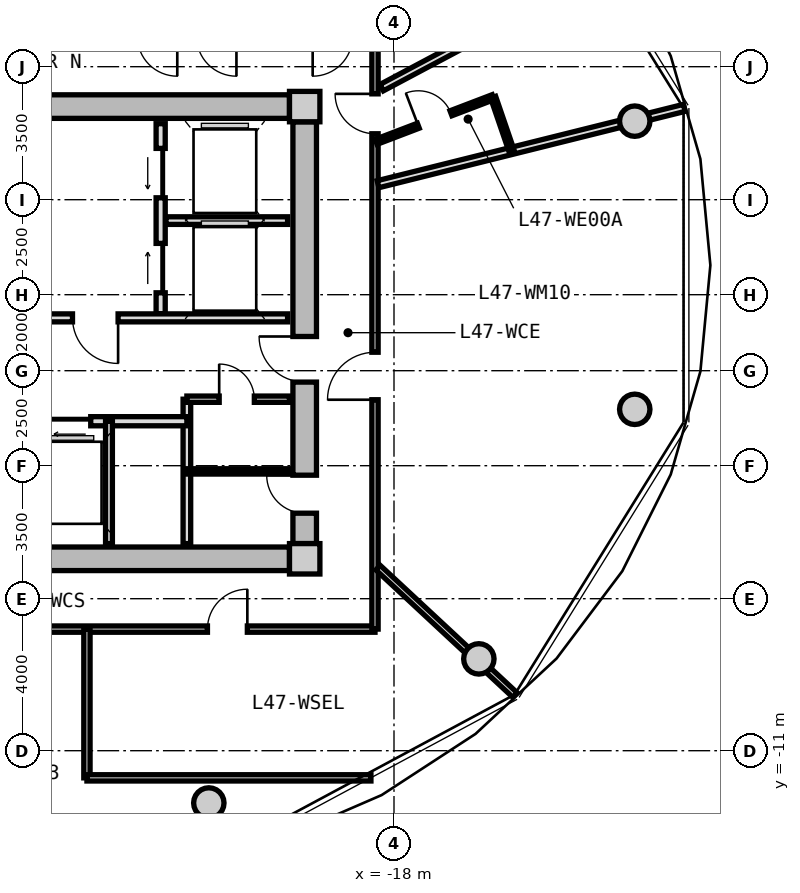
"""IFC4 building model, lengths in metres.
Left out: names, types, materials, properties, quantities, classifications, styles, units other than length and angle.
Written with IfcOpenShell. Run it as: python <this file> out.ifc"""

import sys

from ifc_helpers import new_model, si_unit, direction, frame, frame_2d, origin, origin_2d, place, context, subcontext, project, spatial, rectangle, circle, extrude, source, transform, mapped, element, fill, save


model = new_model("IFC4")
c1 = context("Model", 3, precision=1e-05, world=origin(), true_north=direction((0.0, 1.0)))
c2 = subcontext(c1, "Body", "Model", "MODEL_VIEW")
j1 = project(units=[si_unit("LENGTHUNIT", "METRE"), si_unit("PLANEANGLEUNIT", "RADIAN")], contexts=[c1])
p1 = place(None, origin())
s1 = spatial("IfcSite", under=j1, at=p1, CompositionType="ELEMENT")
p2 = place(p1, origin())
s2 = spatial("IfcBuilding", under=s1, at=p2, CompositionType="ELEMENT")
p3 = place(p2, frame((0.0, 0.0, 152.6)))
s3 = spatial("IfcBuildingStorey", under=s2, at=p3, CompositionType="ELEMENT", Elevation=152.6)
m1 = source(origin(), c2, "Body", "SweptSolid", [
    extrude(rectangle(XDim=0.8, YDim=0.8, at=origin_2d()), origin(), (0.0, 0.0, 1.0), 3.05),
])
for number, where, z_axis, x_axis in (
    (1, (-20.35, -5.95, 0.0), (0.0, 0.0, 1.0), (1.0, 0.0, 0.0)),
    (2, (-20.35, 5.95, 0.0), (0.0, 0.0, 1.0), (1.0, 0.0, 0.0)),
):
    element("IfcColumn", number, at=place(p3, frame(where, z_axis=z_axis, x_axis=x_axis)), inside=s3, PredefinedType="COLUMN", context=c2, shape_type="MappedRepresentation", body=[
        mapped(m1, transform((0.0, 0.0, 0.0), x_axis=(1.0, 0.0, 0.0), y_axis=(0.0, 1.0, 0.0), z_axis=(0.0, 0.0, 1.0), scale=1.0)),
    ])
m2 = source(origin(), c2, "Body", "SweptSolid", [
    extrude(rectangle(XDim=14.5, YDim=0.62, at=frame_2d((7.25, 0.0))), origin(), (0.0, 0.0, 1.0), 2.81),
])
for number, where, z_axis, x_axis in (
    (3, (-35.25, 5.95, 0.0), (0.0, 0.0, 1.0), (1.0, 0.0, 0.0)),
    (4, (-20.75, -5.95, 0.0), (0.0, 0.0, 1.0), (-1.0, 0.0, 0.0)),
):
    element("IfcWall", number, at=place(p3, frame(where, z_axis=z_axis, x_axis=x_axis)), inside=s3, PredefinedType="SHEAR", context=c2, shape_type="MappedRepresentation", body=[
        mapped(m2, transform((0.0, 0.0, 0.0), x_axis=(1.0, 0.0, 0.0), y_axis=(0.0, 1.0, 0.0), z_axis=(0.0, 0.0, 1.0), scale=1.0)),
    ])
m3 = source(origin(), c2, "Body", "SweptSolid", [
    extrude(rectangle(XDim=11.1, YDim=0.62, at=frame_2d((5.55, 0.0))), origin(), (0.0, 0.0, 1.0), 2.81),
])
p4 = place(p3, frame((-20.35, 5.55, 0.0), z_axis=(0.0, 0.0, 1.0), x_axis=(0.0, -1.0, 0.0)))
e5 = element("IfcWall", 5, at=p4, inside=s3, PredefinedType="SHEAR", context=c2, shape_type="MappedRepresentation", body=[
    mapped(m3, transform((0.0, 0.0, 0.0), x_axis=(1.0, 0.0, 0.0), y_axis=(0.0, 1.0, 0.0), z_axis=(0.0, 0.0, 1.0), scale=1.0)),
])
p5 = place(p4, frame((5.65, 0.0, 0.0)))
e6 = element("IfcOpeningElement", 6, at=p5, cuts=e5, PredefinedType="OPENING", context=c2, shape_type="SweptSolid", body=[
    extrude(rectangle(XDim=1.2, YDim=2.15, at=frame_2d((0.6, 1.075))), frame((0.0, 0.32, 0.0), z_axis=(0.0, -1.0, 0.0), x_axis=(1.0, 0.0, 0.0)), (0.0, 0.0, 1.0), 0.64),
])
p6 = place(p4, frame((9.3, 0.0, 0.0)))
e7 = element("IfcOpeningElement", 7, at=p6, cuts=e5, PredefinedType="OPENING", context=c2, shape_type="SweptSolid", body=[
    extrude(rectangle(XDim=1.0, YDim=2.1, at=frame_2d((0.5, 1.05))), frame((0.0, 0.32, 0.0), z_axis=(0.0, -1.0, 0.0), x_axis=(1.0, 0.0, 0.0)), (0.0, 0.0, 1.0), 0.64),
])
m4 = source(origin(), c2, "Body", "SweptSolid", [
    extrude(circle(Radius=0.4, at=origin_2d()), origin(), (0.0, 0.0, 1.0), 3.05),
])
for number, where, z_axis, x_axis in (
    (8, (-11.665, 5.567, 0.0), (0.0, 0.0, 1.0), (1.0, 0.0, 0.0)),
    (9, (-22.873, -12.375, 0.0), (0.0, 0.0, 1.0), (1.0, 0.0, 0.0)),
    (10, (-15.767, -8.584, 0.0), (0.0, 0.0, 1.0), (1.0, 0.0, 0.0)),
    (11, (-11.665, -2.016, 0.0), (0.0, 0.0, 1.0), (1.0, 0.0, 0.0)),
):
    element("IfcColumn", number, at=place(p3, frame(where, z_axis=z_axis, x_axis=x_axis)), inside=s3, PredefinedType="COLUMN", context=c2, shape_type="MappedRepresentation", body=[
        mapped(m4, transform((0.0, 0.0, 0.0), x_axis=(1.0, 0.0, 0.0), y_axis=(0.0, 1.0, 0.0), z_axis=(0.0, 0.0, 1.0), scale=1.0)),
    ])
m5 = source(origin(), c2, "Body", "SweptSolid", [
    extrude(rectangle(XDim=5.0, YDim=0.24, at=frame_2d((2.5, 0.0))), origin(), (0.0, 0.0, 1.0), 2.795),
])
p7 = place(p3, frame((-24.14, 0.5, 0.0), z_axis=(0.0, 0.0, 1.0), x_axis=(0.0, 1.0, 0.0)))
e12 = element("IfcWall", 12, at=p7, inside=s3, PredefinedType="PARTITIONING", context=c2, shape_type="MappedRepresentation", body=[
    mapped(m5, transform((0.0, 0.0, 0.0), x_axis=(1.0, 0.0, 0.0), y_axis=(0.0, 1.0, 0.0), z_axis=(0.0, 0.0, 1.0), scale=1.0)),
])
p8 = place(p7, frame((3.05, 0.0, 0.0)))
e13 = element("IfcOpeningElement", 13, at=p8, cuts=e12, PredefinedType="OPENING", context=c2, shape_type="SweptSolid", body=[
    extrude(rectangle(XDim=1.3, YDim=2.2, at=frame_2d((0.65, 1.1))), frame((0.0, 0.13, 0.0), z_axis=(0.0, -1.0, 0.0), x_axis=(1.0, 0.0, 0.0)), (0.0, 0.0, 1.0), 0.26),
])
p9 = place(p7, frame((0.55, 0.0, 0.0)))
e14 = element("IfcOpeningElement", 14, at=p9, cuts=e12, PredefinedType="OPENING", context=c2, shape_type="SweptSolid", body=[
    extrude(rectangle(XDim=1.3, YDim=2.2, at=frame_2d((0.65, 1.1))), frame((0.0, 0.13, 0.0), z_axis=(0.0, -1.0, 0.0), x_axis=(1.0, 0.0, 0.0)), (0.0, 0.0, 1.0), 0.26),
])
m6 = source(origin(), c2, "Body", "SweptSolid", [
    extrude(rectangle(XDim=3.2, YDim=0.2, at=frame_2d((1.6, 0.0))), origin(), (0.0, 0.0, 1.0), 2.795),
])
p10 = place(p3, frame((-24.0, 2.95, 0.0), z_axis=(0.0, 0.0, 1.0), x_axis=(1.0, 0.0, 0.0)))
e15 = element("IfcWall", 15, at=p10, inside=s3, PredefinedType="PARTITIONING", context=c2, shape_type="MappedRepresentation", body=[
    mapped(m6, transform((0.0, 0.0, 0.0), x_axis=(1.0, 0.0, 0.0), y_axis=(0.0, 1.0, 0.0), z_axis=(0.0, 0.0, 1.0), scale=1.0)),
])
m7 = source(origin(), c2, "Body", "SweptSolid", [
    extrude(rectangle(XDim=6.66, YDim=0.21, at=frame_2d((3.33, 0.0))), origin(), (0.0, 0.0, 1.0), 2.795),
])
p11 = place(p3, frame((-27.46, 0.39, 0.0), z_axis=(0.0, 0.0, 1.0), x_axis=(1.0, 0.0, 0.0)))
e16 = element("IfcWall", 16, at=p11, inside=s3, PredefinedType="PARTITIONING", context=c2, shape_type="MappedRepresentation", body=[
    mapped(m7, transform((0.0, 0.0, 0.0), x_axis=(1.0, 0.0, 0.0), y_axis=(0.0, 1.0, 0.0), z_axis=(0.0, 0.0, 1.0), scale=1.0)),
])
p12 = place(p11, frame((1.0, 0.0, 0.0)))
e17 = element("IfcOpeningElement", 17, at=p12, cuts=e16, PredefinedType="OPENING", context=c2, shape_type="SweptSolid", body=[
    extrude(rectangle(XDim=1.2, YDim=2.15, at=frame_2d((0.6, 1.075))), frame((0.0, 0.115, 0.0), z_axis=(0.0, -1.0, 0.0), x_axis=(1.0, 0.0, 0.0)), (0.0, 0.0, 1.0), 0.23),
])
m8 = source(origin(), c2, "Body", "SweptSolid", [
    extrude(rectangle(XDim=3.8, YDim=0.2, at=frame_2d((1.9, 0.0))), origin(), (0.0, 0.0, 1.0), 2.795),
])
p13 = place(p3, frame((-23.45, -5.55, 0.0), z_axis=(0.0, 0.0, 1.0), x_axis=(0.0, 1.0, 0.0)))
e18 = element("IfcWall", 18, at=p13, inside=s3, PredefinedType="PARTITIONING", context=c2, shape_type="MappedRepresentation", body=[
    mapped(m8, transform((0.0, 0.0, 0.0), x_axis=(1.0, 0.0, 0.0), y_axis=(0.0, 1.0, 0.0), z_axis=(0.0, 0.0, 1.0), scale=1.0)),
])
m9 = source(origin(), c2, "Body", "SweptSolid", [
    extrude(rectangle(XDim=4.13, YDim=0.24, at=frame_2d((2.065, 0.0))), origin(), (0.0, 0.0, 1.0), 2.795),
])
p14 = place(p3, frame((-27.58, -2.33, 0.0), z_axis=(0.0, 0.0, 1.0), x_axis=(1.0, 0.0, 0.0)))
e19 = element("IfcWall", 19, at=p14, inside=s3, PredefinedType="PARTITIONING", context=c2, shape_type="MappedRepresentation", body=[
    mapped(m9, transform((0.0, 0.0, 0.0), x_axis=(1.0, 0.0, 0.0), y_axis=(0.0, 1.0, 0.0), z_axis=(0.0, 0.0, 1.0), scale=1.0)),
])
p15 = place(p14, frame((0.5, 0.0, 0.0)))
e20 = element("IfcOpeningElement", 20, at=p15, cuts=e19, PredefinedType="OPENING", context=c2, shape_type="SweptSolid", body=[
    extrude(rectangle(XDim=1.1, YDim=2.2, at=frame_2d((0.55, 1.1))), frame((0.0, 0.13, 0.0), z_axis=(0.0, -1.0, 0.0), x_axis=(1.0, 0.0, 0.0)), (0.0, 0.0, 1.0), 0.26),
])
m10 = source(origin(), c2, "Body", "SweptSolid", [
    extrude(rectangle(XDim=3.22, YDim=0.18, at=frame_2d((1.61, 0.0))), origin(), (0.0, 0.0, 1.0), 2.795),
])
p16 = place(p3, frame((-25.5, -5.55, 0.0), z_axis=(0.0, 0.0, 1.0), x_axis=(0.0, 1.0, 0.0)))
e21 = element("IfcWall", 21, at=p16, inside=s3, PredefinedType="PARTITIONING", context=c2, shape_type="MappedRepresentation", body=[
    mapped(m10, transform((0.0, 0.0, 0.0), x_axis=(1.0, 0.0, 0.0), y_axis=(0.0, 1.0, 0.0), z_axis=(0.0, 0.0, 1.0), scale=1.0)),
])
m11 = source(origin(), c2, "Body", "SweptSolid", [
    extrude(rectangle(XDim=2.7, YDim=0.165, at=frame_2d((1.35, 0.0))), origin(), (0.0, 0.0, 1.0), 2.795),
])
p17 = place(p3, frame((-23.45, -1.75, 0.0), z_axis=(0.0, 0.0, 1.0), x_axis=(1.0, 0.0, 0.0)))
e22 = element("IfcWall", 22, at=p17, inside=s3, PredefinedType="PARTITIONING", context=c2, shape_type="MappedRepresentation", body=[
    mapped(m11, transform((0.0, 0.0, 0.0), x_axis=(1.0, 0.0, 0.0), y_axis=(0.0, 1.0, 0.0), z_axis=(0.0, 0.0, 1.0), scale=1.0)),
])
p18 = place(p17, frame((0.85, 0.0, 0.0)))
e23 = element("IfcOpeningElement", 23, at=p18, cuts=e22, PredefinedType="OPENING", context=c2, shape_type="SweptSolid", body=[
    extrude(rectangle(XDim=0.925, YDim=2.1, at=frame_2d((0.462, 1.05))), frame((0.0, 0.093, 0.0), z_axis=(0.0, -1.0, 0.0), x_axis=(1.0, 0.0, 0.0)), (0.0, 0.0, 1.0), 0.185),
])
m12 = source(origin(), c2, "Body", "SweptSolid", [
    extrude(rectangle(XDim=2.7, YDim=0.14, at=frame_2d((1.35, 0.0))), origin(), (0.0, 0.0, 1.0), 2.795),
])
p19 = place(p3, frame((-23.45, -3.65, 0.0), z_axis=(0.0, 0.0, 1.0), x_axis=(1.0, 0.0, 0.0)))
e24 = element("IfcWall", 24, at=p19, inside=s3, PredefinedType="PARTITIONING", context=c2, shape_type="MappedRepresentation", body=[
    mapped(m12, transform((0.0, 0.0, 0.0), x_axis=(1.0, 0.0, 0.0), y_axis=(0.0, 1.0, 0.0), z_axis=(0.0, 0.0, 1.0), scale=1.0)),
])
m13 = source(origin(), c2, "Body", "SweptSolid", [
    extrude(rectangle(XDim=8.6, YDim=0.165, at=frame_2d((4.3, 0.0))), origin(), (0.0, 0.0, 1.0), 2.795),
])
p20 = place(p3, frame((-18.5, -7.8, 0.0), z_axis=(0.0, 0.0, 1.0), x_axis=(-1.0, 0.0, 0.0)))
e25 = element("IfcWall", 25, at=p20, inside=s3, PredefinedType="PARTITIONING", context=c2, shape_type="MappedRepresentation", body=[
    mapped(m13, transform((0.0, 0.0, 0.0), x_axis=(1.0, 0.0, 0.0), y_axis=(0.0, 1.0, 0.0), z_axis=(0.0, 0.0, 1.0), scale=1.0)),
])
p21 = place(p20, frame((3.359, 0.0, 0.0)))
e26 = element("IfcOpeningElement", 26, at=p21, cuts=e25, PredefinedType="OPENING", context=c2, shape_type="SweptSolid", body=[
    extrude(rectangle(XDim=1.05, YDim=2.15, at=frame_2d((0.525, 1.075))), frame((0.0, 0.093, 0.0), z_axis=(0.0, -1.0, 0.0), x_axis=(1.0, 0.0, 0.0)), (0.0, 0.0, 1.0), 0.185),
])
m14 = source(origin(), c2, "Body", "SweptSolid", [
    extrude(rectangle(XDim=15.6, YDim=0.165, at=frame_2d((7.8, 0.0))), origin(), (0.0, 0.0, 1.0), 2.795),
])
p22 = place(p3, frame((-18.5, 7.8, 0.0), z_axis=(0.0, 0.0, 1.0), x_axis=(0.0, -1.0, 0.0)))
e27 = element("IfcWall", 27, at=p22, inside=s3, PredefinedType="PARTITIONING", context=c2, shape_type="MappedRepresentation", body=[
    mapped(m14, transform((0.0, 0.0, 0.0), x_axis=(1.0, 0.0, 0.0), y_axis=(0.0, 1.0, 0.0), z_axis=(0.0, 0.0, 1.0), scale=1.0)),
])
p23 = place(p22, frame((8.314, 0.0, 0.0)))
e28 = element("IfcOpeningElement", 28, at=p23, cuts=e27, PredefinedType="OPENING", context=c2, shape_type="SweptSolid", body=[
    extrude(rectangle(XDim=1.25, YDim=2.2, at=frame_2d((0.625, 1.1))), frame((0.0, 0.093, 0.0), z_axis=(0.0, -1.0, 0.0), x_axis=(1.0, 0.0, 0.0)), (0.0, 0.0, 1.0), 0.185),
])
p24 = place(p22, frame((1.515, 0.0, 0.0)))
e29 = element("IfcOpeningElement", 29, at=p24, cuts=e27, PredefinedType="OPENING", context=c2, shape_type="SweptSolid", body=[
    extrude(rectangle(XDim=1.05, YDim=2.15, at=frame_2d((0.525, 1.075))), frame((0.0, 0.093, 0.0), z_axis=(0.0, -1.0, 0.0), x_axis=(1.0, 0.0, 0.0)), (0.0, 0.0, 1.0), 0.185),
])
m15 = source(origin(), c2, "Body", "SweptSolid", [
    extrude(rectangle(XDim=4.927, YDim=0.165, at=frame_2d((2.463, 0.0))), origin(), (0.0, 0.0, 1.0), 2.345),
])
p25 = place(p3, frame((-18.42, -6.183, 0.0), z_axis=(0.0, 0.0, 1.0), x_axis=(0.732191335987, -0.681098999783, 0.0)))
e30 = element("IfcWall", 30, at=p25, inside=s3, PredefinedType="PARTITIONING", context=c2, shape_type="MappedRepresentation", body=[
    mapped(m15, transform((0.0, 0.0, 0.0), x_axis=(1.0, 0.0, 0.0), y_axis=(0.0, 1.0, 0.0), z_axis=(0.0, 0.0, 1.0), scale=1.0)),
])
m16 = source(origin(), c2, "Body", "SweptSolid", [
    extrude(rectangle(XDim=3.915, YDim=0.165, at=frame_2d((1.957, 0.0))), origin(), (0.0, 0.0, 1.0), 2.795),
])
p26 = place(p3, frame((-26.08, -11.715, 0.0), z_axis=(0.0, 0.0, 1.0), x_axis=(0.0, 1.0, 0.0)))
e31 = element("IfcWall", 31, at=p26, inside=s3, PredefinedType="PARTITIONING", context=c2, shape_type="MappedRepresentation", body=[
    mapped(m16, transform((0.0, 0.0, 0.0), x_axis=(1.0, 0.0, 0.0), y_axis=(0.0, 1.0, 0.0), z_axis=(0.0, 0.0, 1.0), scale=1.0)),
])
m17 = source(origin(), c2, "Body", "SweptSolid", [
    extrude(rectangle(XDim=7.473, YDim=0.165, at=frame_2d((3.737, 0.0))), origin(), (0.0, 0.0, 1.0), 2.795),
])
p27 = place(p3, frame((-26.08, -11.715, 0.0), z_axis=(0.0, 0.0, 1.0), x_axis=(1.0, 0.0, 0.0)))
e32 = element("IfcWall", 32, at=p27, inside=s3, PredefinedType="PARTITIONING", context=c2, shape_type="MappedRepresentation", body=[
    mapped(m17, transform((0.0, 0.0, 0.0), x_axis=(1.0, 0.0, 0.0), y_axis=(0.0, 1.0, 0.0), z_axis=(0.0, 0.0, 1.0), scale=1.0)),
])
m18 = source(origin(), c2, "Body", "SweptSolid", [
    extrude(rectangle(XDim=8.305, YDim=0.19, at=frame_2d((4.153, 0.0))), origin(), (0.0, 0.0, 1.0), 2.345),
])
p28 = place(p3, frame((-18.42, 3.908, 0.0), z_axis=(0.0, 0.0, 1.0), x_axis=(0.970309994378, 0.241864662175, 0.0)))
e33 = element("IfcWall", 33, at=p28, inside=s3, PredefinedType="PARTITIONING", context=c2, shape_type="MappedRepresentation", body=[
    mapped(m18, transform((0.0, 0.0, 0.0), x_axis=(1.0, 0.0, 0.0), y_axis=(0.0, 1.0, 0.0), z_axis=(0.0, 0.0, 1.0), scale=1.0)),
])
m19 = source(origin(), c2, "Body", "SweptSolid", [
    extrude(rectangle(XDim=6.499, YDim=0.19, at=frame_2d((3.25, 0.0))), origin(), (0.0, 0.0, 1.0), 2.795),
])
p29 = place(p3, frame((-18.324, 6.449, 0.0), z_axis=(0.0, 0.0, 1.0), x_axis=(0.882715595921, 0.469907625729, 0.0)))
e34 = element("IfcWall", 34, at=p29, inside=s3, PredefinedType="PARTITIONING", context=c2, shape_type="MappedRepresentation", body=[
    mapped(m19, transform((0.0, 0.0, 0.0), x_axis=(1.0, 0.0, 0.0), y_axis=(0.0, 1.0, 0.0), z_axis=(0.0, 0.0, 1.0), scale=1.0)),
])
m20 = source(origin(), c2, "Body", "SweptSolid", [
    extrude(rectangle(XDim=3.295, YDim=0.14, at=frame_2d((1.647, 0.0))), origin(), (0.0, 0.0, 1.0), 2.795),
])
p30 = place(p3, frame((-18.47, 5.023, 0.0), z_axis=(0.0, 0.0, 1.0), x_axis=(0.934202224769, 0.356743890258, 0.0)))
e35 = element("IfcWall", 35, at=p30, inside=s3, PredefinedType="PARTITIONING", context=c2, shape_type="MappedRepresentation", body=[
    mapped(m20, transform((0.0, 0.0, 0.0), x_axis=(1.0, 0.0, 0.0), y_axis=(0.0, 1.0, 0.0), z_axis=(0.0, 0.0, 1.0), scale=1.0)),
])
p31 = place(p30, frame((1.188, 0.0, 0.0)))
e36 = element("IfcOpeningElement", 36, at=p31, cuts=e35, PredefinedType="OPENING", context=c2, shape_type="SweptSolid", body=[
    extrude(rectangle(XDim=0.92, YDim=2.1, at=frame_2d((0.46, 1.05))), frame((0.0, 0.08, 0.0), z_axis=(0.0, -1.0, 0.0), x_axis=(1.0, 0.0, 0.0)), (0.0, 0.0, 1.0), 0.16),
])
m21 = source(origin(), c2, "Body", "SweptSolid", [
    extrude(rectangle(XDim=1.479, YDim=0.14, at=frame_2d((0.739, 0.0))), origin(), (0.0, 0.0, 1.0), 2.795),
])
p32 = place(p3, frame((-15.392, 6.198, 0.0), z_axis=(0.0, 0.0, 1.0), x_axis=(0.324438293903, -0.945906862989, 0.0)))
e37 = element("IfcWall", 37, at=p32, inside=s3, PredefinedType="PARTITIONING", context=c2, shape_type="MappedRepresentation", body=[
    mapped(m21, transform((0.0, 0.0, 0.0), x_axis=(1.0, 0.0, 0.0), y_axis=(0.0, 1.0, 0.0), z_axis=(0.0, 0.0, 1.0), scale=1.0)),
])
m22 = source(origin(), c2, "Body", "SweptSolid", [
    extrude(rectangle(XDim=1.3, YDim=2.2, at=frame_2d((0.65, 1.1))), frame((0.0, 0.025, 0.0), z_axis=(0.0, -1.0, 0.0), x_axis=(1.0, 0.0, 0.0)), (0.0, 0.0, 1.0), 0.05),
])
p33 = place(p8, origin())
e38 = element("IfcDoor", 38, at=p33, inside=s3, OperationType="SLIDING_TO_LEFT", PredefinedType="DOOR", context=c2, shape_type="MappedRepresentation", body=[
    mapped(m22, transform((0.0, 0.0, 0.0), x_axis=(1.0, 0.0, 0.0), y_axis=(0.0, 1.0, 0.0), z_axis=(0.0, 0.0, 1.0), scale=1.0)),
])
fill(e13, e38)
p34 = place(p9, origin())
e39 = element("IfcDoor", 39, at=p34, inside=s3, OperationType="SLIDING_TO_RIGHT", PredefinedType="DOOR", context=c2, shape_type="MappedRepresentation", body=[
    mapped(m22, transform((0.0, 0.0, 0.0), x_axis=(1.0, 0.0, 0.0), y_axis=(0.0, 1.0, 0.0), z_axis=(0.0, 0.0, 1.0), scale=1.0)),
])
fill(e14, e39)
m23 = source(origin(), c2, "Body", "SweptSolid", [
    extrude(rectangle(XDim=1.2, YDim=2.15, at=frame_2d((0.6, 1.075))), frame((0.0, 0.025, 0.0), z_axis=(0.0, -1.0, 0.0), x_axis=(1.0, 0.0, 0.0)), (0.0, 0.0, 1.0), 0.05),
])
p35 = place(p12, frame((1.2, 0.0, 0.0), z_axis=(0.0, 0.0, 1.0), x_axis=(-1.0, 0.0, 0.0)))
e40 = element("IfcDoor", 40, at=p35, inside=s3, OperationType="SINGLE_SWING_LEFT", PredefinedType="DOOR", context=c2, shape_type="MappedRepresentation", body=[
    mapped(m23, transform((0.0, 0.0, 0.0), x_axis=(1.0, 0.0, 0.0), y_axis=(0.0, 1.0, 0.0), z_axis=(0.0, 0.0, 1.0), scale=1.0)),
])
fill(e17, e40)
p36 = place(p5, frame((1.2, 0.0, 0.0), z_axis=(0.0, 0.0, 1.0), x_axis=(-1.0, 0.0, 0.0)))
e41 = element("IfcDoor", 41, at=p36, inside=s3, OperationType="SINGLE_SWING_RIGHT", PredefinedType="DOOR", context=c2, shape_type="MappedRepresentation", body=[
    mapped(m23, transform((0.0, 0.0, 0.0), x_axis=(1.0, 0.0, 0.0), y_axis=(0.0, 1.0, 0.0), z_axis=(0.0, 0.0, 1.0), scale=1.0)),
])
fill(e6, e41)
m24 = source(origin(), c2, "Body", "SweptSolid", [
    extrude(rectangle(XDim=1.1, YDim=2.2, at=frame_2d((0.55, 1.1))), frame((0.0, 0.025, 0.0), z_axis=(0.0, -1.0, 0.0), x_axis=(1.0, 0.0, 0.0)), (0.0, 0.0, 1.0), 0.05),
])
p37 = place(p15, frame((1.1, 0.0, 0.0), z_axis=(0.0, 0.0, 1.0), x_axis=(-1.0, 0.0, 0.0)))
e42 = element("IfcDoor", 42, at=p37, inside=s3, OperationType="SLIDING_TO_LEFT", PredefinedType="DOOR", context=c2, shape_type="MappedRepresentation", body=[
    mapped(m24, transform((0.0, 0.0, 0.0), x_axis=(1.0, 0.0, 0.0), y_axis=(0.0, 1.0, 0.0), z_axis=(0.0, 0.0, 1.0), scale=1.0)),
])
fill(e20, e42)
m25 = source(origin(), c2, "Body", "SweptSolid", [
    extrude(rectangle(XDim=0.925, YDim=2.1, at=frame_2d((0.462, 1.05))), frame((0.0, 0.025, 0.0), z_axis=(0.0, -1.0, 0.0), x_axis=(1.0, 0.0, 0.0)), (0.0, 0.0, 1.0), 0.05),
])
p38 = place(p18, origin())
e43 = element("IfcDoor", 43, at=p38, inside=s3, OperationType="SINGLE_SWING_LEFT", PredefinedType="DOOR", context=c2, shape_type="MappedRepresentation", body=[
    mapped(m25, transform((0.0, 0.0, 0.0), x_axis=(1.0, 0.0, 0.0), y_axis=(0.0, 1.0, 0.0), z_axis=(0.0, 0.0, 1.0), scale=1.0)),
])
fill(e23, e43)
m26 = source(origin(), c2, "Body", "SweptSolid", [
    extrude(rectangle(XDim=1.0, YDim=2.1, at=frame_2d((0.5, 1.05))), frame((0.0, 0.025, 0.0), z_axis=(0.0, -1.0, 0.0), x_axis=(1.0, 0.0, 0.0)), (0.0, 0.0, 1.0), 0.05),
])
p39 = place(p6, frame((1.0, 0.0, 0.0), z_axis=(0.0, 0.0, 1.0), x_axis=(-1.0, 0.0, 0.0)))
e44 = element("IfcDoor", 44, at=p39, inside=s3, OperationType="SINGLE_SWING_RIGHT", PredefinedType="DOOR", context=c2, shape_type="MappedRepresentation", body=[
    mapped(m26, transform((0.0, 0.0, 0.0), x_axis=(1.0, 0.0, 0.0), y_axis=(0.0, 1.0, 0.0), z_axis=(0.0, 0.0, 1.0), scale=1.0)),
])
fill(e7, e44)
m27 = source(origin(), c2, "Body", "SweptSolid", [
    extrude(rectangle(XDim=1.05, YDim=2.15, at=frame_2d((0.525, 1.075))), frame((0.0, 0.025, 0.0), z_axis=(0.0, -1.0, 0.0), x_axis=(1.0, 0.0, 0.0)), (0.0, 0.0, 1.0), 0.05),
])
p40 = place(p21, frame((1.05, 0.0, 0.0), z_axis=(0.0, 0.0, 1.0), x_axis=(-1.0, 0.0, 0.0)))
e45 = element("IfcDoor", 45, at=p40, inside=s3, OperationType="SINGLE_SWING_RIGHT", PredefinedType="DOOR", context=c2, shape_type="MappedRepresentation", body=[
    mapped(m27, transform((0.0, 0.0, 0.0), x_axis=(1.0, 0.0, 0.0), y_axis=(0.0, 1.0, 0.0), z_axis=(0.0, 0.0, 1.0), scale=1.0)),
])
fill(e26, e45)
m28 = source(origin(), c2, "Body", "SweptSolid", [
    extrude(rectangle(XDim=1.25, YDim=2.2, at=frame_2d((0.625, 1.1))), frame((0.0, 0.025, 0.0), z_axis=(0.0, -1.0, 0.0), x_axis=(1.0, 0.0, 0.0)), (0.0, 0.0, 1.0), 0.05),
])
p41 = place(p23, frame((1.25, 0.0, 0.0), z_axis=(0.0, 0.0, 1.0), x_axis=(-1.0, 0.0, 0.0)))
e46 = element("IfcDoor", 46, at=p41, inside=s3, OperationType="SINGLE_SWING_LEFT", PredefinedType="DOOR", context=c2, shape_type="MappedRepresentation", body=[
    mapped(m28, transform((0.0, 0.0, 0.0), x_axis=(1.0, 0.0, 0.0), y_axis=(0.0, 1.0, 0.0), z_axis=(0.0, 0.0, 1.0), scale=1.0)),
])
fill(e28, e46)
p42 = place(p24, frame((1.05, 0.0, 0.0), z_axis=(0.0, 0.0, 1.0), x_axis=(-1.0, 0.0, 0.0)))
e47 = element("IfcDoor", 47, at=p42, inside=s3, OperationType="SINGLE_SWING_RIGHT", PredefinedType="DOOR", context=c2, shape_type="MappedRepresentation", body=[
    mapped(m27, transform((0.0, 0.0, 0.0), x_axis=(1.0, 0.0, 0.0), y_axis=(0.0, 1.0, 0.0), z_axis=(0.0, 0.0, 1.0), scale=1.0)),
])
fill(e29, e47)
m29 = source(origin(), c2, "Body", "SweptSolid", [
    extrude(rectangle(XDim=0.92, YDim=2.1, at=frame_2d((0.46, 1.05))), frame((0.0, 0.025, 0.0), z_axis=(0.0, -1.0, 0.0), x_axis=(1.0, 0.0, 0.0)), (0.0, 0.0, 1.0), 0.05),
])
p43 = place(p31, origin())
e48 = element("IfcDoor", 48, at=p43, inside=s3, OperationType="SINGLE_SWING_LEFT", PredefinedType="DOOR", context=c2, shape_type="MappedRepresentation", body=[
    mapped(m29, transform((0.0, 0.0, 0.0), x_axis=(1.0, 0.0, 0.0), y_axis=(0.0, 1.0, 0.0), z_axis=(0.0, 0.0, 1.0), scale=1.0)),
])
fill(e36, e48)
save(model, sys.argv[1])
